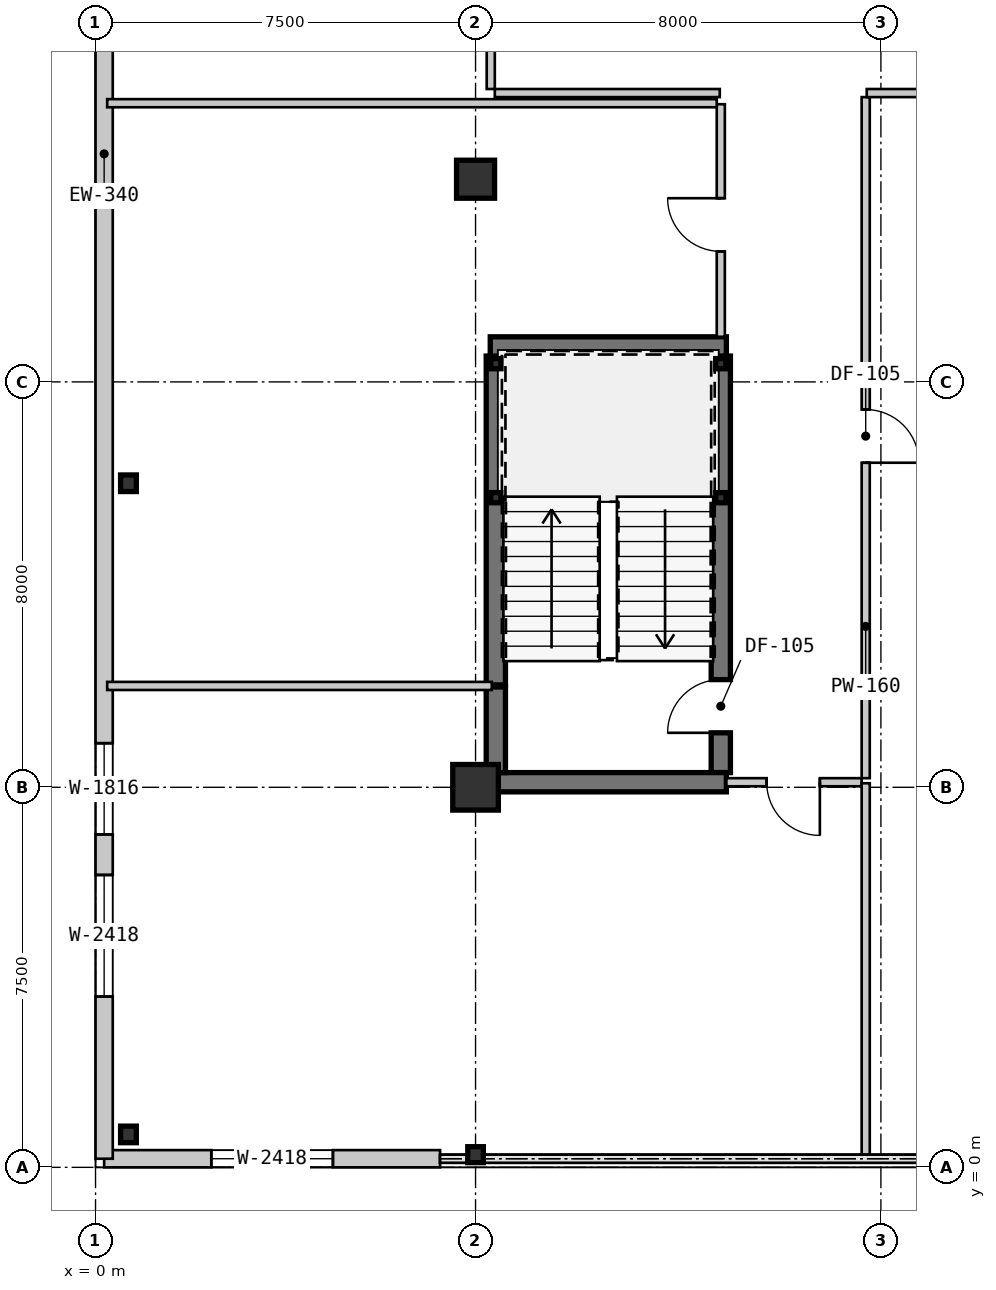
"""IFC4 building model, lengths in metres.
Left out: names, types, materials, properties, quantities, classifications, styles, units other than length and angle.
Written with IfcOpenShell. Run it as: python <this file> out.ifc"""

import sys

from ifc_helpers import new_model, si_unit, direction, frame, frame_2d, origin, origin_2d, place, context, subcontext, project, spatial, rectangle, hollow_rectangle, circle, i_section, extrude, source, transform, mapped, element, fill, save


model = new_model("IFC4")
c1 = context("Model", 3, precision=1e-05, world=origin(), true_north=direction((0.0, 1.0)))
c2 = subcontext(c1, "Body", "Model", "MODEL_VIEW")
j1 = project(units=[si_unit("LENGTHUNIT", "METRE"), si_unit("PLANEANGLEUNIT", "RADIAN")], contexts=[c1])
p1 = place(None, origin())
s1 = spatial("IfcSite", under=j1, at=p1, CompositionType="ELEMENT")
p2 = place(p1, origin())
s2 = spatial("IfcBuilding", under=s1, at=p2, CompositionType="ELEMENT")
p3 = place(p2, frame((0.0, 0.0, 4.55)))
s3 = spatial("IfcBuildingStorey", under=s2, at=p3, CompositionType="ELEMENT", Elevation=4.55)
m1 = source(origin(), c2, "Body", "SweptSolid", [
    extrude(circle(Radius=0.45, at=origin_2d()), origin(), (0.0, 0.0, 1.0), 3.85),
])
p4 = place(p3, frame((7.5, 7.5, 0.0), z_axis=(0.0, 0.0, 1.0), x_axis=(1.0, 0.0, 0.0)))
e1 = element("IfcColumn", 1, at=p4, inside=s3, PredefinedType="COLUMN", context=c2, shape_type="MappedRepresentation", body=[
    mapped(m1, transform((0.0, 0.0, 0.0), scale=1.0)),
])
m2 = source(origin(), c2, "Body", "SweptSolid", [
    extrude(circle(Radius=0.375, at=origin_2d()), origin(), (0.0, 0.0, 1.0), 3.85),
])
p5 = place(p3, frame((7.5, 19.5, 0.0), z_axis=(0.0, 0.0, 1.0), x_axis=(1.0, 0.0, 0.0)))
e2 = element("IfcColumn", 2, at=p5, inside=s3, PredefinedType="COLUMN", context=c2, shape_type="MappedRepresentation", body=[
    mapped(m2, transform((0.0, 0.0, 0.0), scale=1.0)),
])
m3 = source(origin(), c2, "Body", "SweptSolid", [
    extrude(i_section(OverallWidth=0.311, OverallDepth=0.327, WebThickness=0.016, FlangeThickness=0.025, at=origin_2d()), origin(), (0.0, 0.0, 1.0), 3.85),
])
for number, where, z_axis, x_axis in (
    (3, (0.65, 0.65, 0.0), (0.0, 0.0, 1.0), (1.0, 0.0, 0.0)),
    (4, (0.65, 13.5, 0.0), (0.0, 0.0, 1.0), (1.0, 0.0, 0.0)),
):
    element("IfcColumn", number, at=place(p3, frame(where, z_axis=z_axis, x_axis=x_axis)), inside=s3, PredefinedType="COLUMN", context=c2, shape_type="MappedRepresentation", body=[
        mapped(m3, transform((0.0, 0.0, 0.0), scale=1.0)),
    ])
m4 = source(origin(), c2, "Body", "SweptSolid", [
    extrude(hollow_rectangle(XDim=0.2, YDim=0.2, WallThickness=0.009, at=origin_2d()), origin(), (0.0, 0.0, 1.0), 3.85),
])
for number, where, z_axis, x_axis in (
    (5, (7.9, 13.215, 0.0), (0.0, 0.0, 1.0), (1.0, 0.0, 0.0)),
    (6, (12.34, 13.215, 0.0), (0.0, 0.0, 1.0), (1.0, 0.0, 0.0)),
    (7, (7.9, 15.86, 0.0), (0.0, 0.0, 1.0), (1.0, 0.0, 0.0)),
    (8, (12.34, 15.86, 0.0), (0.0, 0.0, 1.0), (1.0, 0.0, 0.0)),
):
    element("IfcColumn", number, at=place(p3, frame(where, z_axis=z_axis, x_axis=x_axis)), inside=s3, PredefinedType="COLUMN", context=c2, shape_type="MappedRepresentation", body=[
        mapped(m4, transform((0.0, 0.0, 0.0), scale=1.0)),
    ])
m5 = source(origin(), c2, "Body", "SweptSolid", [
    extrude(i_section(OverallWidth=0.307, OverallDepth=0.315, WebThickness=0.012, FlangeThickness=0.019, at=origin_2d()), origin(), (0.0, 0.0, 1.0), 3.85),
])
p6 = place(p3, frame((7.5, 0.25, 0.0), z_axis=(0.0, 0.0, 1.0), x_axis=(1.0, 0.0, 0.0)))
e9 = element("IfcColumn", 9, at=p6, inside=s3, PredefinedType="PILASTER", context=c2, shape_type="MappedRepresentation", body=[
    mapped(m5, transform((0.0, 0.0, 0.0), scale=1.0)),
])
m6 = source(origin(), c2, "Body", "SweptSolid", [
    extrude(rectangle(XDim=6.63, YDim=0.34, at=frame_2d((3.315, 0.0))), origin(), (0.0, 0.0, 1.0), 3.59),
])
p7 = place(p3, frame((0.17, 0.17, 0.0), z_axis=(0.0, 0.0, 1.0), x_axis=(1.0, 0.0, 0.0)))
e10 = element("IfcWall", 10, at=p7, inside=s3, PredefinedType="SOLIDWALL", context=c2, shape_type="MappedRepresentation", body=[
    mapped(m6, transform((0.0, 0.0, 0.0), scale=1.0)),
])
m7 = source(origin(), c2, "Body", "SweptSolid", [
    extrude(rectangle(XDim=2.4, YDim=1.8, at=frame_2d((1.2, 0.9))), frame((0.0, 0.18, 0.0), z_axis=(0.0, -1.0, 0.0), x_axis=(1.0, 0.0, 0.0)), (0.0, 0.0, 1.0), 0.36),
])
p8 = place(p7, frame((2.115, 0.0, 0.9)))
e11 = element("IfcOpeningElement", 11, at=p8, cuts=e10, PredefinedType="OPENING", context=c2, shape_type="MappedRepresentation", body=[
    mapped(m7, transform((0.0, 0.0, 0.0), scale=1.0)),
])
m8 = source(origin(), c2, "Body", "SweptSolid", [
    extrude(rectangle(XDim=39.66, YDim=0.34, at=frame_2d((19.83, 0.0))), origin(), (0.0, 0.0, 1.0), 3.59),
])
p9 = place(p3, frame((0.17, 0.17, 0.0), z_axis=(0.0, 0.0, 1.0), x_axis=(0.0, 1.0, 0.0)))
e12 = element("IfcWall", 12, at=p9, inside=s3, PredefinedType="SOLIDWALL", context=c2, shape_type="MappedRepresentation", body=[
    mapped(m8, transform((0.0, 0.0, 0.0), scale=1.0)),
])
p10 = place(p9, frame((3.2, 0.0, 0.95)))
e13 = element("IfcOpeningElement", 13, at=p10, cuts=e12, PredefinedType="OPENING", context=c2, shape_type="MappedRepresentation", body=[
    mapped(m7, transform((0.0, 0.0, 0.0), scale=1.0)),
])
m9 = source(origin(), c2, "Body", "SweptSolid", [
    extrude(rectangle(XDim=1.8, YDim=1.6, at=frame_2d((0.9, 0.8))), frame((0.0, 0.18, 0.0), z_axis=(0.0, -1.0, 0.0), x_axis=(1.0, 0.0, 0.0)), (0.0, 0.0, 1.0), 0.36),
])
p11 = place(p9, frame((6.4, 0.0, 0.95)))
e14 = element("IfcOpeningElement", 14, at=p11, cuts=e12, PredefinedType="OPENING", context=c2, shape_type="MappedRepresentation", body=[
    mapped(m9, transform((0.0, 0.0, 0.0), scale=1.0)),
])
m10 = source(origin(), c2, "Body", "SweptSolid", [
    extrude(rectangle(XDim=1.5, YDim=1.5, at=frame_2d((0.75, 0.75))), frame((0.0, 0.18, 0.0), z_axis=(0.0, -1.0, 0.0), x_axis=(1.0, 0.0, 0.0)), (0.0, 0.0, 1.0), 0.36),
])
p12 = place(p9, frame((22.6, 0.0, 0.95)))
e15 = element("IfcOpeningElement", 15, at=p12, cuts=e12, PredefinedType="OPENING", context=c2, shape_type="MappedRepresentation", body=[
    mapped(m10, transform((0.0, 0.0, 0.0), scale=1.0)),
])
m11 = source(origin(), c2, "Body", "SweptSolid", [
    extrude(rectangle(XDim=1.2, YDim=1.5, at=frame_2d((0.6, 0.75))), frame((0.0, 0.18, 0.0), z_axis=(0.0, -1.0, 0.0), x_axis=(1.0, 0.0, 0.0)), (0.0, 0.0, 1.0), 0.36),
])
p13 = place(p9, frame((34.6, 0.0, 0.95)))
e16 = element("IfcOpeningElement", 16, at=p13, cuts=e12, PredefinedType="OPENING", context=c2, shape_type="MappedRepresentation", body=[
    mapped(m11, transform((0.0, 0.0, 0.0), scale=1.0)),
])
m12 = source(origin(), c2, "Body", "SweptSolid", [
    extrude(rectangle(XDim=8.22, YDim=0.38, at=frame_2d((4.11, 0.0))), origin(), (0.0, 0.0, 1.0), 3.59),
])
p14 = place(p3, frame((12.34, 16.01, 0.0), z_axis=(0.0, 0.0, 1.0), x_axis=(0.0, -1.0, 0.0)))
e17 = element("IfcWall", 17, at=p14, inside=s3, PredefinedType="SHEAR", context=c2, shape_type="MappedRepresentation", body=[
    mapped(m12, transform((0.0, 0.0, 0.0), scale=1.0)),
])
m13 = source(origin(), c2, "Body", "SweptSolid", [
    extrude(rectangle(XDim=1.05, YDim=2.1, at=frame_2d((0.525, 1.05))), frame((0.0, 0.2, 0.0), z_axis=(0.0, -1.0, 0.0), x_axis=(1.0, 0.0, 0.0)), (0.0, 0.0, 1.0), 0.4),
])
p15 = place(p14, frame((6.385, 0.0, 0.0)))
e18 = element("IfcOpeningElement", 18, at=p15, cuts=e17, PredefinedType="OPENING", context=c2, shape_type="MappedRepresentation", body=[
    mapped(m13, transform((0.0, 0.0, 0.0), scale=1.0)),
])
m14 = source(origin(), c2, "Body", "SweptSolid", [
    extrude(rectangle(XDim=4.66, YDim=0.38, at=frame_2d((2.33, 0.0))), origin(), (0.0, 0.0, 1.0), 3.59),
])
p16 = place(p3, frame((12.45, 7.6, 0.0), z_axis=(0.0, 0.0, 1.0), x_axis=(-1.0, 0.0, 0.0)))
e19 = element("IfcWall", 19, at=p16, inside=s3, PredefinedType="SHEAR", context=c2, shape_type="MappedRepresentation", body=[
    mapped(m14, transform((0.0, 0.0, 0.0), scale=1.0)),
])
m15 = source(origin(), c2, "Body", "SweptSolid", [
    extrude(rectangle(XDim=1.69, YDim=0.38, at=frame_2d((0.845, 0.0))), origin(), (0.0, 0.0, 1.0), 3.59),
])
p17 = place(p3, frame((7.9, 7.79, 0.0), z_axis=(0.0, 0.0, 1.0), x_axis=(0.0, 1.0, 0.0)))
e20 = element("IfcWall", 20, at=p17, inside=s3, PredefinedType="SHEAR", context=c2, shape_type="MappedRepresentation", body=[
    mapped(m15, transform((0.0, 0.0, 0.0), scale=1.0)),
])
m16 = source(origin(), c2, "Body", "SweptSolid", [
    extrude(rectangle(XDim=6.49, YDim=0.38, at=frame_2d((3.245, 0.0))), origin(), (0.0, 0.0, 1.0), 3.59),
])
p18 = place(p3, frame((7.9, 9.52, 0.0), z_axis=(0.0, 0.0, 1.0), x_axis=(0.0, 1.0, 0.0)))
e21 = element("IfcWall", 21, at=p18, inside=s3, PredefinedType="SHEAR", context=c2, shape_type="MappedRepresentation", body=[
    mapped(m16, transform((0.0, 0.0, 0.0), scale=1.0)),
])
p19 = place(p3, frame((7.79, 16.2, 0.0), z_axis=(0.0, 0.0, 1.0), x_axis=(1.0, 0.0, 0.0)))
e22 = element("IfcWall", 22, at=p19, inside=s3, PredefinedType="SHEAR", context=c2, shape_type="MappedRepresentation", body=[
    mapped(m14, transform((0.0, 0.0, 0.0), scale=1.0)),
])
m17 = source(origin(), c2, "Body", "SweptSolid", [
    extrude(rectangle(XDim=13.44, YDim=0.16, at=frame_2d((6.72, 0.0))), origin(), (0.0, 0.0, 1.0), 3.59),
])
p20 = place(p3, frame((15.2, 21.12, 0.0), z_axis=(0.0, 0.0, 1.0), x_axis=(0.0, -1.0, 0.0)))
e23 = element("IfcWall", 23, at=p20, inside=s3, PredefinedType="PARTITIONING", context=c2, shape_type="MappedRepresentation", body=[
    mapped(m17, transform((0.0, 0.0, 0.0), scale=1.0)),
])
m18 = source(origin(), c2, "Body", "SweptSolid", [
    extrude(rectangle(XDim=1.05, YDim=2.1, at=frame_2d((0.525, 1.05))), frame((0.0, 0.09, 0.0), z_axis=(0.0, -1.0, 0.0), x_axis=(1.0, 0.0, 0.0)), (0.0, 0.0, 1.0), 0.18),
])
p21 = place(p20, frame((6.165, 0.0, 0.0)))
e24 = element("IfcOpeningElement", 24, at=p21, cuts=e23, PredefinedType="OPENING", context=c2, shape_type="MappedRepresentation", body=[
    mapped(m18, transform((0.0, 0.0, 0.0), scale=1.0)),
])
m19 = source(origin(), c2, "Body", "SweptSolid", [
    extrude(rectangle(XDim=12.76, YDim=0.16, at=frame_2d((6.38, 0.0))), origin(), (0.0, 0.0, 1.0), 3.59),
])
p22 = place(p3, frame((27.98, 21.2, 0.0), z_axis=(0.0, 0.0, 1.0), x_axis=(-1.0, 0.0, 0.0)))
e25 = element("IfcWall", 25, at=p22, inside=s3, PredefinedType="PARTITIONING", context=c2, shape_type="MappedRepresentation", body=[
    mapped(m19, transform((0.0, 0.0, 0.0), scale=1.0)),
])
m20 = source(origin(), c2, "Body", "SweptSolid", [
    extrude(rectangle(XDim=2.67, YDim=0.16, at=frame_2d((1.335, 0.0))), origin(), (0.0, 0.0, 1.0), 3.59),
])
p23 = place(p3, frame((15.12, 7.6, 0.0), z_axis=(0.0, 0.0, 1.0), x_axis=(-1.0, 0.0, 0.0)))
e26 = element("IfcWall", 26, at=p23, inside=s3, PredefinedType="PARTITIONING", context=c2, shape_type="MappedRepresentation", body=[
    mapped(m20, transform((0.0, 0.0, 0.0), scale=1.0)),
])
p24 = place(p23, frame((0.825, 0.0, 0.0)))
e27 = element("IfcOpeningElement", 27, at=p24, cuts=e26, PredefinedType="OPENING", context=c2, shape_type="MappedRepresentation", body=[
    mapped(m18, transform((0.0, 0.0, 0.0), scale=1.0)),
])
m21 = source(origin(), c2, "Body", "SweptSolid", [
    extrude(rectangle(XDim=4.59, YDim=0.16, at=frame_2d((2.295, 0.0))), origin(), (0.0, 0.0, 1.0), 3.59),
])
p25 = place(p3, frame((12.34, 16.39, 0.0), z_axis=(0.0, 0.0, 1.0), x_axis=(0.0, 1.0, 0.0)))
e28 = element("IfcWall", 28, at=p25, inside=s3, PredefinedType="PARTITIONING", context=c2, shape_type="MappedRepresentation", body=[
    mapped(m21, transform((0.0, 0.0, 0.0), scale=1.0)),
])
p26 = place(p25, frame((1.685, 0.0, 0.0)))
e29 = element("IfcOpeningElement", 29, at=p26, cuts=e28, PredefinedType="OPENING", context=c2, shape_type="MappedRepresentation", body=[
    mapped(m18, transform((0.0, 0.0, 0.0), scale=1.0)),
])
m22 = source(origin(), c2, "Body", "SweptSolid", [
    extrude(rectangle(XDim=4.44, YDim=0.16, at=frame_2d((2.22, 0.0))), origin(), (0.0, 0.0, 1.0), 3.59),
])
p27 = place(p3, frame((12.32, 21.2, 0.0), z_axis=(0.0, 0.0, 1.0), x_axis=(-1.0, 0.0, 0.0)))
e30 = element("IfcWall", 30, at=p27, inside=s3, PredefinedType="PARTITIONING", context=c2, shape_type="MappedRepresentation", body=[
    mapped(m22, transform((0.0, 0.0, 0.0), scale=1.0)),
])
m23 = source(origin(), c2, "Body", "SweptSolid", [
    extrude(rectangle(XDim=2.64, YDim=0.16, at=frame_2d((1.32, 0.0))), origin(), (0.0, 0.0, 1.0), 3.59),
])
p28 = place(p3, frame((7.8, 21.28, 0.0), z_axis=(0.0, 0.0, 1.0), x_axis=(0.0, 1.0, 0.0)))
e31 = element("IfcWall", 31, at=p28, inside=s3, PredefinedType="PARTITIONING", context=c2, shape_type="MappedRepresentation", body=[
    mapped(m23, transform((0.0, 0.0, 0.0), scale=1.0)),
])
m24 = source(origin(), c2, "Body", "SweptSolid", [
    extrude(rectangle(XDim=7.35, YDim=0.16, at=frame_2d((3.675, 0.0))), origin(), (0.0, 0.0, 1.0), 3.59),
])
p29 = place(p3, frame((15.2, 0.23, 0.0), z_axis=(0.0, 0.0, 1.0), x_axis=(0.0, 1.0, 0.0)))
e32 = element("IfcWall", 32, at=p29, inside=s3, PredefinedType="PARTITIONING", context=c2, shape_type="MappedRepresentation", body=[
    mapped(m24, transform((0.0, 0.0, 0.0), scale=1.0)),
])
m25 = source(origin(), c2, "Body", "SweptSolid", [
    extrude(rectangle(XDim=7.59, YDim=0.16, at=frame_2d((3.795, 0.0))), origin(), (0.0, 0.0, 1.0), 3.59),
])
p30 = place(p3, frame((0.23, 9.5, 0.0), z_axis=(0.0, 0.0, 1.0), x_axis=(1.0, 0.0, 0.0)))
e33 = element("IfcWall", 33, at=p30, inside=s3, PredefinedType="PARTITIONING", context=c2, shape_type="MappedRepresentation", body=[
    mapped(m25, transform((0.0, 0.0, 0.0), scale=1.0)),
])
m26 = source(origin(), c2, "Body", "SweptSolid", [
    extrude(rectangle(XDim=12.03, YDim=0.16, at=frame_2d((6.015, 0.0))), origin(), (0.0, 0.0, 1.0), 3.59),
])
p31 = place(p3, frame((0.23, 21.0, 0.0), z_axis=(0.0, 0.0, 1.0), x_axis=(1.0, 0.0, 0.0)))
e34 = element("IfcWall", 34, at=p31, inside=s3, PredefinedType="PARTITIONING", context=c2, shape_type="MappedRepresentation", body=[
    mapped(m26, transform((0.0, 0.0, 0.0), scale=1.0)),
])
m27 = source(origin(), c2, "Body", "SweptSolid", [
    extrude(rectangle(XDim=2.4, YDim=1.8, at=frame_2d((1.2, 0.9))), frame((0.0, 0.03, 0.0), z_axis=(0.0, -1.0, 0.0), x_axis=(1.0, 0.0, 0.0)), (0.0, 0.0, 1.0), 0.06),
])
p32 = place(p8, origin())
e35 = element("IfcWindow", 35, at=p32, inside=s3, PartitioningType="SINGLE_PANEL", PredefinedType="WINDOW", context=c2, shape_type="MappedRepresentation", body=[
    mapped(m27, transform((0.0, 0.0, 0.0), scale=1.0)),
])
fill(e11, e35)
p33 = place(p10, origin())
e36 = element("IfcWindow", 36, at=p33, inside=s3, PartitioningType="SINGLE_PANEL", PredefinedType="WINDOW", context=c2, shape_type="MappedRepresentation", body=[
    mapped(m27, transform((0.0, 0.0, 0.0), scale=1.0)),
])
fill(e13, e36)
m28 = source(origin(), c2, "Body", "SweptSolid", [
    extrude(rectangle(XDim=1.8, YDim=1.6, at=frame_2d((0.9, 0.8))), frame((0.0, 0.03, 0.0), z_axis=(0.0, -1.0, 0.0), x_axis=(1.0, 0.0, 0.0)), (0.0, 0.0, 1.0), 0.06),
])
p34 = place(p11, origin())
e37 = element("IfcWindow", 37, at=p34, inside=s3, PartitioningType="SINGLE_PANEL", PredefinedType="WINDOW", context=c2, shape_type="MappedRepresentation", body=[
    mapped(m28, transform((0.0, 0.0, 0.0), scale=1.0)),
])
fill(e14, e37)
m29 = source(origin(), c2, "Body", "SweptSolid", [
    extrude(rectangle(XDim=1.05, YDim=2.1, at=frame_2d((0.525, 1.05))), frame((0.0, 0.025, 0.0), z_axis=(0.0, -1.0, 0.0), x_axis=(1.0, 0.0, 0.0)), (0.0, 0.0, 1.0), 0.05),
])
p35 = place(p15, frame((1.05, 0.0, 0.0), z_axis=(0.0, 0.0, 1.0), x_axis=(-1.0, 0.0, 0.0)))
e38 = element("IfcDoor", 38, at=p35, inside=s3, OperationType="SINGLE_SWING_LEFT", PredefinedType="DOOR", context=c2, shape_type="MappedRepresentation", body=[
    mapped(m29, transform((0.0, 0.0, 0.0), scale=1.0)),
])
fill(e18, e38)
p36 = place(p21, origin())
e39 = element("IfcDoor", 39, at=p36, inside=s3, OperationType="SINGLE_SWING_RIGHT", PredefinedType="DOOR", context=c2, shape_type="MappedRepresentation", body=[
    mapped(m29, transform((0.0, 0.0, 0.0), scale=1.0)),
])
fill(e24, e39)
p37 = place(p24, origin())
e40 = element("IfcDoor", 40, at=p37, inside=s3, OperationType="SINGLE_SWING_LEFT", PredefinedType="DOOR", context=c2, shape_type="MappedRepresentation", body=[
    mapped(m29, transform((0.0, 0.0, 0.0), scale=1.0)),
])
fill(e27, e40)
p38 = place(p26, origin())
e41 = element("IfcDoor", 41, at=p38, inside=s3, OperationType="SINGLE_SWING_RIGHT", PredefinedType="DOOR", context=c2, shape_type="MappedRepresentation", body=[
    mapped(m29, transform((0.0, 0.0, 0.0), scale=1.0)),
])
fill(e29, e41)
save(model, sys.argv[1])
